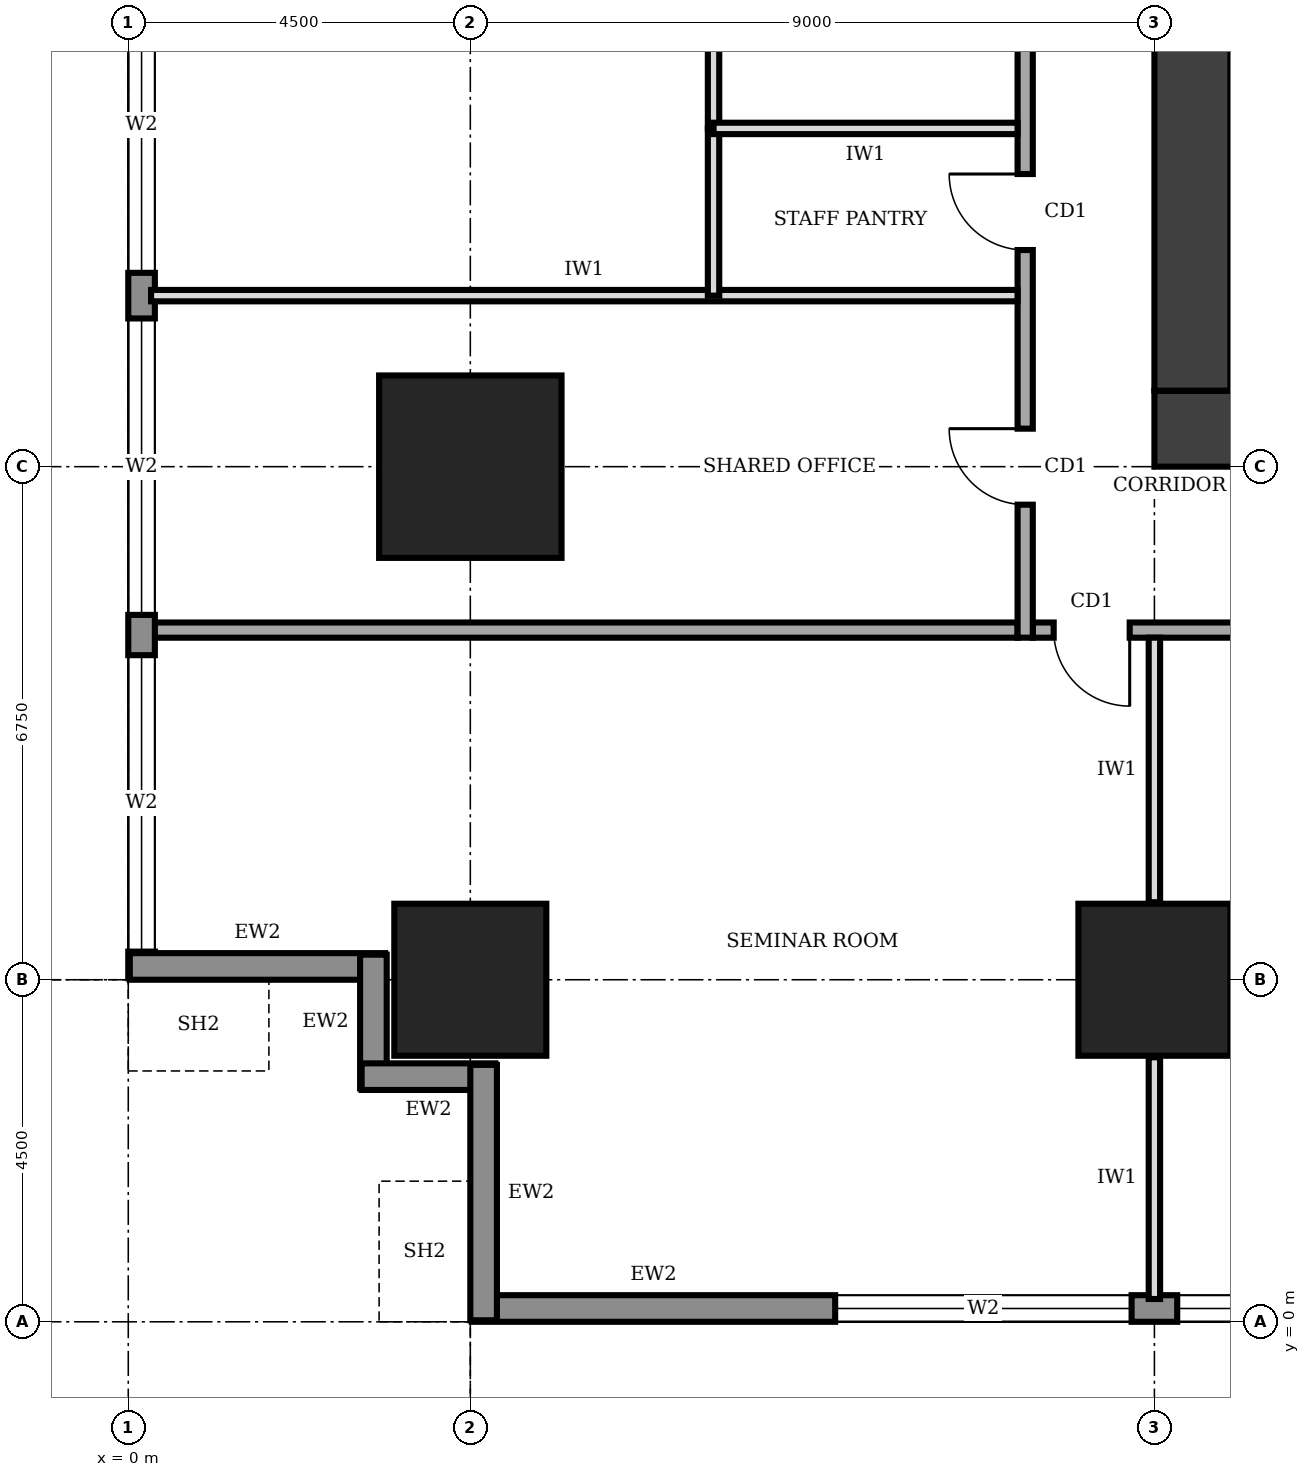
"""IFC4 building model, lengths in metres.
Left out: names, types, materials, properties, quantities, classifications, styles, units other than length and angle.
Written with IfcOpenShell. Run it as: python <this file> out.ifc"""

import sys

from ifc_helpers import new_model, si_unit, direction, frame, frame_2d, origin, origin_2d, place, context, subcontext, project, spatial, rectangle, extrude, element, fill, save


model = new_model("IFC4")
c1 = context("Model", 3, precision=1e-05, world=origin(), true_north=direction((0.0, 1.0)))
c2 = subcontext(c1, "Body", "Model", "MODEL_VIEW")
j1 = project(units=[si_unit("LENGTHUNIT", "METRE"), si_unit("PLANEANGLEUNIT", "RADIAN")], contexts=[c1])
p1 = place(None, origin())
s1 = spatial("IfcSite", under=j1, at=p1, CompositionType="ELEMENT")
p2 = place(p1, origin())
s2 = spatial("IfcBuilding", under=s1, at=p2, CompositionType="ELEMENT")
p3 = place(p2, frame((0.0, 0.0, 57.0)))
s3 = spatial("IfcBuildingStorey", under=s2, at=p3, CompositionType="ELEMENT", Elevation=57.0)
p4 = place(p3, frame((13.5, 11.75, 0.0), z_axis=(0.0, 0.0, 1.0), x_axis=(1.0, 0.0, 0.0)))
e1 = element("IfcWall", 1, at=p4, inside=s3, PredefinedType="SHEAR", context=c2, shape_type="SweptSolid", body=[
    extrude(rectangle(XDim=13.5, YDim=1.0, at=frame_2d((6.75, 0.0))), origin(), (0.0, 0.0, 1.0), 4.0),
])
p5 = place(p4, frame((4.75, 0.0, 0.0)))
e2 = element("IfcOpeningElement", 2, at=p5, cuts=e1, PredefinedType="OPENING", context=c2, shape_type="SweptSolid", body=[
    extrude(rectangle(XDim=1.0, YDim=2.1, at=frame_2d((0.5, 1.05))), frame((0.0, 0.51, 0.0), z_axis=(0.0, -1.0, 0.0), x_axis=(1.0, 0.0, 0.0)), (0.0, 0.0, 1.0), 1.02),
])
p6 = place(p3, frame((14.0, 28.25, 0.0), z_axis=(0.0, 0.0, 1.0), x_axis=(0.0, -1.0, 0.0)))
e3 = element("IfcWall", 3, at=p6, inside=s3, PredefinedType="SHEAR", context=c2, shape_type="SweptSolid", body=[
    extrude(rectangle(XDim=16.0, YDim=1.0, at=frame_2d((8.0, 0.0))), origin(), (0.0, 0.0, 1.0), 4.0),
])
for number, where, z_axis, x_axis in (
    (4, (4.5, 4.5, 0.0), (0.0, 0.0, 1.0), (1.0, 0.0, 0.0)),
    (5, (13.5, 4.5, 0.0), (0.0, 0.0, 1.0), (1.0, 0.0, 0.0)),
):
    element("IfcColumn", number, at=place(p3, frame(where, z_axis=z_axis, x_axis=x_axis)), inside=s3, PredefinedType="COLUMN", context=c2, shape_type="SweptSolid", body=[
        extrude(rectangle(XDim=2.0, YDim=2.0, at=origin_2d()), origin(), (0.0, 0.0, 1.0), 4.0),
    ])
p7 = place(p3, frame((4.5, 11.25, 0.0), z_axis=(0.0, 0.0, 1.0), x_axis=(1.0, 0.0, 0.0)))
e6 = element("IfcColumn", 6, at=p7, inside=s3, PredefinedType="COLUMN", context=c2, shape_type="SweptSolid", body=[
    extrude(rectangle(XDim=2.4, YDim=2.4, at=origin_2d()), origin(), (0.0, 0.0, 1.0), 4.0),
])
p8 = place(p3, frame((4.52, 0.175, 0.0), z_axis=(0.0, 0.0, 1.0), x_axis=(1.0, 0.0, 0.0)))
e7 = element("IfcWall", 7, at=p8, inside=s3, PredefinedType="STANDARD", context=c2, shape_type="SweptSolid", body=[
    extrude(rectangle(XDim=31.46, YDim=0.35, at=frame_2d((15.73, 0.0))), origin(), (0.0, 0.0, 1.0), 3.75),
])
p9 = place(p8, frame((4.78, 0.0, 0.6)))
e8 = element("IfcOpeningElement", 8, at=p9, cuts=e7, PredefinedType="OPENING", context=c2, shape_type="SweptSolid", body=[
    extrude(rectangle(XDim=3.9, YDim=2.6, at=frame_2d((1.95, 1.3))), frame((0.0, 0.185, 0.0), z_axis=(0.0, -1.0, 0.0), x_axis=(1.0, 0.0, 0.0)), (0.0, 0.0, 1.0), 0.37),
])
p10 = place(p8, frame((9.28, 0.0, 0.6)))
e9 = element("IfcOpeningElement", 9, at=p10, cuts=e7, PredefinedType="OPENING", context=c2, shape_type="SweptSolid", body=[
    extrude(rectangle(XDim=3.9, YDim=2.6, at=frame_2d((1.95, 1.3))), frame((0.0, 0.185, 0.0), z_axis=(0.0, -1.0, 0.0), x_axis=(1.0, 0.0, 0.0)), (0.0, 0.0, 1.0), 0.37),
])
p11 = place(p8, frame((13.78, 0.0, 0.6)))
e10 = element("IfcOpeningElement", 10, at=p11, cuts=e7, PredefinedType="OPENING", context=c2, shape_type="SweptSolid", body=[
    extrude(rectangle(XDim=3.9, YDim=2.6, at=frame_2d((1.95, 1.3))), frame((0.0, 0.185, 0.0), z_axis=(0.0, -1.0, 0.0), x_axis=(1.0, 0.0, 0.0)), (0.0, 0.0, 1.0), 0.37),
])
p12 = place(p8, frame((18.28, 0.0, 0.6)))
e11 = element("IfcOpeningElement", 11, at=p12, cuts=e7, PredefinedType="OPENING", context=c2, shape_type="SweptSolid", body=[
    extrude(rectangle(XDim=3.9, YDim=2.6, at=frame_2d((1.95, 1.3))), frame((0.0, 0.185, 0.0), z_axis=(0.0, -1.0, 0.0), x_axis=(1.0, 0.0, 0.0)), (0.0, 0.0, 1.0), 0.37),
])
p13 = place(p8, frame((22.78, 0.0, 0.6)))
e12 = element("IfcOpeningElement", 12, at=p13, cuts=e7, PredefinedType="OPENING", context=c2, shape_type="SweptSolid", body=[
    extrude(rectangle(XDim=3.9, YDim=2.6, at=frame_2d((1.95, 1.3))), frame((0.0, 0.185, 0.0), z_axis=(0.0, -1.0, 0.0), x_axis=(1.0, 0.0, 0.0)), (0.0, 0.0, 1.0), 0.37),
])
p14 = place(p8, frame((27.21, 0.0, 0.6)))
e13 = element("IfcOpeningElement", 13, at=p14, cuts=e7, PredefinedType="OPENING", context=c2, shape_type="SweptSolid", body=[
    extrude(rectangle(XDim=3.9, YDim=2.6, at=frame_2d((1.95, 1.3))), frame((0.0, 0.185, 0.0), z_axis=(0.0, -1.0, 0.0), x_axis=(1.0, 0.0, 0.0)), (0.0, 0.0, 1.0), 0.37),
])
p15 = place(p3, frame((0.175, 35.98, 0.0), z_axis=(0.0, 0.0, 1.0), x_axis=(0.0, -1.0, 0.0)))
e14 = element("IfcWall", 14, at=p15, inside=s3, PredefinedType="STANDARD", context=c2, shape_type="SweptSolid", body=[
    extrude(rectangle(XDim=31.46, YDim=0.35, at=frame_2d((15.73, 0.0))), origin(), (0.0, 0.0, 1.0), 3.75),
])
p16 = place(p15, frame((27.21, 0.0, 0.6)))
e15 = element("IfcOpeningElement", 15, at=p16, cuts=e14, PredefinedType="OPENING", context=c2, shape_type="SweptSolid", body=[
    extrude(rectangle(XDim=3.9, YDim=2.6, at=frame_2d((1.95, 1.3))), frame((0.0, 0.185, 0.0), z_axis=(0.0, -1.0, 0.0), x_axis=(1.0, 0.0, 0.0)), (0.0, 0.0, 1.0), 0.37),
])
p17 = place(p15, frame((22.78, 0.0, 0.6)))
e16 = element("IfcOpeningElement", 16, at=p17, cuts=e14, PredefinedType="OPENING", context=c2, shape_type="SweptSolid", body=[
    extrude(rectangle(XDim=3.9, YDim=2.6, at=frame_2d((1.95, 1.3))), frame((0.0, 0.185, 0.0), z_axis=(0.0, -1.0, 0.0), x_axis=(1.0, 0.0, 0.0)), (0.0, 0.0, 1.0), 0.37),
])
p18 = place(p15, frame((18.28, 0.0, 0.6)))
e17 = element("IfcOpeningElement", 17, at=p18, cuts=e14, PredefinedType="OPENING", context=c2, shape_type="SweptSolid", body=[
    extrude(rectangle(XDim=3.9, YDim=2.6, at=frame_2d((1.95, 1.3))), frame((0.0, 0.185, 0.0), z_axis=(0.0, -1.0, 0.0), x_axis=(1.0, 0.0, 0.0)), (0.0, 0.0, 1.0), 0.37),
])
p19 = place(p15, frame((13.78, 0.0, 0.6)))
e18 = element("IfcOpeningElement", 18, at=p19, cuts=e14, PredefinedType="OPENING", context=c2, shape_type="SweptSolid", body=[
    extrude(rectangle(XDim=3.9, YDim=2.6, at=frame_2d((1.95, 1.3))), frame((0.0, 0.185, 0.0), z_axis=(0.0, -1.0, 0.0), x_axis=(1.0, 0.0, 0.0)), (0.0, 0.0, 1.0), 0.37),
])
p20 = place(p15, frame((9.28, 0.0, 0.6)))
e19 = element("IfcOpeningElement", 19, at=p20, cuts=e14, PredefinedType="OPENING", context=c2, shape_type="SweptSolid", body=[
    extrude(rectangle(XDim=3.9, YDim=2.6, at=frame_2d((1.95, 1.3))), frame((0.0, 0.185, 0.0), z_axis=(0.0, -1.0, 0.0), x_axis=(1.0, 0.0, 0.0)), (0.0, 0.0, 1.0), 0.37),
])
p21 = place(p15, frame((4.78, 0.0, 0.6)))
e20 = element("IfcOpeningElement", 20, at=p21, cuts=e14, PredefinedType="OPENING", context=c2, shape_type="SweptSolid", body=[
    extrude(rectangle(XDim=3.9, YDim=2.6, at=frame_2d((1.95, 1.3))), frame((0.0, 0.185, 0.0), z_axis=(0.0, -1.0, 0.0), x_axis=(1.0, 0.0, 0.0)), (0.0, 0.0, 1.0), 0.37),
])
p22 = place(p3, frame((0.02, 4.675, 0.0), z_axis=(0.0, 0.0, 1.0), x_axis=(1.0, 0.0, 0.0)))
e21 = element("IfcWall", 21, at=p22, inside=s3, PredefinedType="STANDARD", context=c2, shape_type="SweptSolid", body=[
    extrude(rectangle(XDim=3.36, YDim=0.35, at=frame_2d((1.68, 0.0))), origin(), (0.0, 0.0, 1.0), 2.85),
])
for number, where, z_axis, x_axis in (
    (22, (3.225, 4.83, 0.0), (0.0, 0.0, 1.0), (0.0, -1.0, 0.0)),
    (23, (3.07, 3.225, 0.0), (0.0, 0.0, 1.0), (1.0, 0.0, 0.0)),
):
    element("IfcWall", number, at=place(p3, frame(where, z_axis=z_axis, x_axis=x_axis)), inside=s3, PredefinedType="STANDARD", context=c2, shape_type="SweptSolid", body=[
        extrude(rectangle(XDim=1.76, YDim=0.35, at=frame_2d((0.88, 0.0))), origin(), (0.0, 0.0, 1.0), 3.75),
    ])
p23 = place(p3, frame((4.675, 3.38, 0.0), z_axis=(0.0, 0.0, 1.0), x_axis=(0.0, -1.0, 0.0)))
e24 = element("IfcWall", 24, at=p23, inside=s3, PredefinedType="STANDARD", context=c2, shape_type="SweptSolid", body=[
    extrude(rectangle(XDim=3.36, YDim=0.35, at=frame_2d((1.68, 0.0))), origin(), (0.0, 0.0, 1.0), 2.85),
])
p24 = place(p3, frame((11.9, 9.1, 0.0), z_axis=(0.0, 0.0, 1.0), x_axis=(1.0, 0.0, 0.0)))
e25 = element("IfcWall", 25, at=p24, inside=s3, PredefinedType="SOLIDWALL", context=c2, shape_type="SweptSolid", body=[
    extrude(rectangle(XDim=16.9, YDim=0.2, at=frame_2d((8.45, 0.0))), origin(), (0.0, 0.0, 1.0), 3.75),
])
p25 = place(p24, frame((0.275, 0.0, 0.0)))
e26 = element("IfcOpeningElement", 26, at=p25, cuts=e25, PredefinedType="OPENING", context=c2, shape_type="SweptSolid", body=[
    extrude(rectangle(XDim=1.0, YDim=2.1, at=frame_2d((0.5, 1.05))), frame((0.0, 0.11, 0.0), z_axis=(0.0, -1.0, 0.0), x_axis=(1.0, 0.0, 0.0)), (0.0, 0.0, 1.0), 0.22),
])
p26 = place(p24, frame((7.45, 0.0, 0.0)))
e27 = element("IfcOpeningElement", 27, at=p26, cuts=e25, PredefinedType="OPENING", context=c2, shape_type="SweptSolid", body=[
    extrude(rectangle(XDim=1.8, YDim=2.1, at=frame_2d((0.9, 1.05))), frame((0.0, 0.11, 0.0), z_axis=(0.0, -1.0, 0.0), x_axis=(1.0, 0.0, 0.0)), (0.0, 0.0, 1.0), 0.22),
])
p27 = place(p24, frame((15.425, 0.0, 0.0)))
e28 = element("IfcOpeningElement", 28, at=p27, cuts=e25, PredefinedType="OPENING", context=c2, shape_type="SweptSolid", body=[
    extrude(rectangle(XDim=1.0, YDim=2.1, at=frame_2d((0.5, 1.05))), frame((0.0, 0.11, 0.0), z_axis=(0.0, -1.0, 0.0), x_axis=(1.0, 0.0, 0.0)), (0.0, 0.0, 1.0), 0.22),
])
p28 = place(p3, frame((11.8, 32.8, 0.0), z_axis=(0.0, 0.0, 1.0), x_axis=(0.0, -1.0, 0.0)))
e29 = element("IfcWall", 29, at=p28, inside=s3, PredefinedType="SOLIDWALL", context=c2, shape_type="SweptSolid", body=[
    extrude(rectangle(XDim=23.8, YDim=0.2, at=frame_2d((11.9, 0.0))), origin(), (0.0, 0.0, 1.0), 3.75),
])
p29 = place(p28, frame((21.05, 0.0, 0.0)))
e30 = element("IfcOpeningElement", 30, at=p29, cuts=e29, PredefinedType="OPENING", context=c2, shape_type="SweptSolid", body=[
    extrude(rectangle(XDim=1.0, YDim=2.1, at=frame_2d((0.5, 1.05))), frame((0.0, 0.11, 0.0), z_axis=(0.0, -1.0, 0.0), x_axis=(1.0, 0.0, 0.0)), (0.0, 0.0, 1.0), 0.22),
])
p30 = place(p28, frame((17.7, 0.0, 0.0)))
e31 = element("IfcOpeningElement", 31, at=p30, cuts=e29, PredefinedType="OPENING", context=c2, shape_type="SweptSolid", body=[
    extrude(rectangle(XDim=1.0, YDim=2.1, at=frame_2d((0.5, 1.05))), frame((0.0, 0.11, 0.0), z_axis=(0.0, -1.0, 0.0), x_axis=(1.0, 0.0, 0.0)), (0.0, 0.0, 1.0), 0.22),
])
p31 = place(p28, frame((14.7, 0.0, 0.0)))
e32 = element("IfcOpeningElement", 32, at=p31, cuts=e29, PredefinedType="OPENING", context=c2, shape_type="SweptSolid", body=[
    extrude(rectangle(XDim=0.9, YDim=2.1, at=frame_2d((0.45, 1.05))), frame((0.0, 0.11, 0.0), z_axis=(0.0, -1.0, 0.0), x_axis=(1.0, 0.0, 0.0)), (0.0, 0.0, 1.0), 0.22),
])
p32 = place(p28, frame((11.65, 0.0, 0.0)))
e33 = element("IfcOpeningElement", 33, at=p32, cuts=e29, PredefinedType="OPENING", context=c2, shape_type="SweptSolid", body=[
    extrude(rectangle(XDim=0.9, YDim=2.1, at=frame_2d((0.45, 1.05))), frame((0.0, 0.11, 0.0), z_axis=(0.0, -1.0, 0.0), x_axis=(1.0, 0.0, 0.0)), (0.0, 0.0, 1.0), 0.22),
])
p33 = place(p28, frame((6.95, 0.0, 0.0)))
e34 = element("IfcOpeningElement", 34, at=p33, cuts=e29, PredefinedType="OPENING", context=c2, shape_type="SweptSolid", body=[
    extrude(rectangle(XDim=0.9, YDim=2.1, at=frame_2d((0.45, 1.05))), frame((0.0, 0.11, 0.0), z_axis=(0.0, -1.0, 0.0), x_axis=(1.0, 0.0, 0.0)), (0.0, 0.0, 1.0), 0.22),
])
p34 = place(p28, frame((9.5, 0.0, 0.0)))
e35 = element("IfcOpeningElement", 35, at=p34, cuts=e29, PredefinedType="OPENING", context=c2, shape_type="SweptSolid", body=[
    extrude(rectangle(XDim=1.0, YDim=2.1, at=frame_2d((0.5, 1.05))), frame((0.0, 0.11, 0.0), z_axis=(0.0, -1.0, 0.0), x_axis=(1.0, 0.0, 0.0)), (0.0, 0.0, 1.0), 0.22),
])
p35 = place(p28, frame((2.3, 0.0, 0.0)))
e36 = element("IfcOpeningElement", 36, at=p35, cuts=e29, PredefinedType="OPENING", context=c2, shape_type="SweptSolid", body=[
    extrude(rectangle(XDim=1.0, YDim=2.1, at=frame_2d((0.5, 1.05))), frame((0.0, 0.11, 0.0), z_axis=(0.0, -1.0, 0.0), x_axis=(1.0, 0.0, 0.0)), (0.0, 0.0, 1.0), 0.22),
])
p36 = place(p3, frame((0.3, 9.1, 0.0), z_axis=(0.0, 0.0, 1.0), x_axis=(1.0, 0.0, 0.0)))
e37 = element("IfcWall", 37, at=p36, inside=s3, PredefinedType="SOLIDWALL", context=c2, shape_type="SweptSolid", body=[
    extrude(rectangle(XDim=11.4, YDim=0.2, at=frame_2d((5.7, 0.0))), origin(), (0.0, 0.0, 1.0), 3.75),
])
p37 = place(p3, frame((13.5, 0.3, 0.0), z_axis=(0.0, 0.0, 1.0), x_axis=(0.0, 1.0, 0.0)))
e38 = element("IfcWall", 38, at=p37, inside=s3, PredefinedType="PARTITIONING", context=c2, shape_type="SweptSolid", body=[
    extrude(rectangle(XDim=3.18, YDim=0.15, at=frame_2d((1.59, 0.0))), origin(), (0.0, 0.0, 1.0), 2.85),
])
p38 = place(p3, frame((13.5, 5.52, 0.0), z_axis=(0.0, 0.0, 1.0), x_axis=(0.0, 1.0, 0.0)))
e39 = element("IfcWall", 39, at=p38, inside=s3, PredefinedType="PARTITIONING", context=c2, shape_type="SweptSolid", body=[
    extrude(rectangle(XDim=3.48, YDim=0.15, at=frame_2d((1.74, 0.0))), origin(), (0.0, 0.0, 1.0), 2.85),
])
p39 = place(p3, frame((0.3, 13.5, 0.0), z_axis=(0.0, 0.0, 1.0), x_axis=(1.0, 0.0, 0.0)))
e40 = element("IfcWall", 40, at=p39, inside=s3, PredefinedType="PARTITIONING", context=c2, shape_type="SweptSolid", body=[
    extrude(rectangle(XDim=11.4, YDim=0.15, at=frame_2d((5.7, 0.0))), origin(), (0.0, 0.0, 1.0), 3.75),
])
p40 = place(p3, frame((11.7, 15.7, 0.0), z_axis=(0.0, 0.0, 1.0), x_axis=(-1.0, 0.0, 0.0)))
e41 = element("IfcWall", 41, at=p40, inside=s3, PredefinedType="PARTITIONING", context=c2, shape_type="SweptSolid", body=[
    extrude(rectangle(XDim=4.0, YDim=0.15, at=frame_2d((2.0, 0.0))), origin(), (0.0, 0.0, 1.0), 3.75),
])
p41 = place(p3, frame((7.7, 13.5, 0.0), z_axis=(0.0, 0.0, 1.0), x_axis=(0.0, 1.0, 0.0)))
e42 = element("IfcWall", 42, at=p41, inside=s3, PredefinedType="PARTITIONING", context=c2, shape_type="SweptSolid", body=[
    extrude(rectangle(XDim=2.2, YDim=0.15, at=frame_2d((1.1, 0.0))), origin(), (0.0, 0.0, 1.0), 3.75),
])
p42 = place(p3, frame((7.7, 15.7, 0.0), z_axis=(0.0, 0.0, 1.0), x_axis=(0.0, 1.0, 0.0)))
e43 = element("IfcWall", 43, at=p42, inside=s3, PredefinedType="PARTITIONING", context=c2, shape_type="SweptSolid", body=[
    extrude(rectangle(XDim=3.9, YDim=0.15, at=frame_2d((1.95, 0.0))), origin(), (0.0, 0.0, 1.0), 3.75),
])
p43 = place(p9, origin())
e44 = element("IfcWindow", 44, at=p43, inside=s3, PartitioningType="SINGLE_PANEL", PredefinedType="WINDOW", context=c2, shape_type="SweptSolid", body=[
    extrude(rectangle(XDim=3.9, YDim=2.6, at=frame_2d((1.95, 1.3))), frame((0.0, 0.03, 0.0), z_axis=(0.0, -1.0, 0.0), x_axis=(1.0, 0.0, 0.0)), (0.0, 0.0, 1.0), 0.06),
])
fill(e8, e44)
p44 = place(p10, origin())
e45 = element("IfcWindow", 45, at=p44, inside=s3, PartitioningType="SINGLE_PANEL", PredefinedType="WINDOW", context=c2, shape_type="SweptSolid", body=[
    extrude(rectangle(XDim=3.9, YDim=2.6, at=frame_2d((1.95, 1.3))), frame((0.0, 0.03, 0.0), z_axis=(0.0, -1.0, 0.0), x_axis=(1.0, 0.0, 0.0)), (0.0, 0.0, 1.0), 0.06),
])
fill(e9, e45)
p45 = place(p16, origin())
e46 = element("IfcWindow", 46, at=p45, inside=s3, PartitioningType="SINGLE_PANEL", PredefinedType="WINDOW", context=c2, shape_type="SweptSolid", body=[
    extrude(rectangle(XDim=3.9, YDim=2.6, at=frame_2d((1.95, 1.3))), frame((0.0, 0.03, 0.0), z_axis=(0.0, -1.0, 0.0), x_axis=(1.0, 0.0, 0.0)), (0.0, 0.0, 1.0), 0.06),
])
fill(e15, e46)
p46 = place(p17, origin())
e47 = element("IfcWindow", 47, at=p46, inside=s3, PartitioningType="SINGLE_PANEL", PredefinedType="WINDOW", context=c2, shape_type="SweptSolid", body=[
    extrude(rectangle(XDim=3.9, YDim=2.6, at=frame_2d((1.95, 1.3))), frame((0.0, 0.03, 0.0), z_axis=(0.0, -1.0, 0.0), x_axis=(1.0, 0.0, 0.0)), (0.0, 0.0, 1.0), 0.06),
])
fill(e16, e47)
p47 = place(p18, origin())
e48 = element("IfcWindow", 48, at=p47, inside=s3, PartitioningType="SINGLE_PANEL", PredefinedType="WINDOW", context=c2, shape_type="SweptSolid", body=[
    extrude(rectangle(XDim=3.9, YDim=2.6, at=frame_2d((1.95, 1.3))), frame((0.0, 0.03, 0.0), z_axis=(0.0, -1.0, 0.0), x_axis=(1.0, 0.0, 0.0)), (0.0, 0.0, 1.0), 0.06),
])
fill(e17, e48)
p48 = place(p25, frame((1.0, 0.0, 0.0), z_axis=(0.0, 0.0, 1.0), x_axis=(-1.0, 0.0, 0.0)))
e49 = element("IfcDoor", 49, at=p48, inside=s3, OperationType="SINGLE_SWING_LEFT", PredefinedType="DOOR", context=c2, shape_type="SweptSolid", body=[
    extrude(rectangle(XDim=1.0, YDim=2.1, at=frame_2d((0.5, 1.05))), frame((0.0, 0.025, 0.0), z_axis=(0.0, -1.0, 0.0), x_axis=(1.0, 0.0, 0.0)), (0.0, 0.0, 1.0), 0.05),
])
fill(e26, e49)
p49 = place(p29, frame((1.0, 0.0, 0.0), z_axis=(0.0, 0.0, 1.0), x_axis=(-1.0, 0.0, 0.0)))
e50 = element("IfcDoor", 50, at=p49, inside=s3, OperationType="SINGLE_SWING_RIGHT", PredefinedType="DOOR", context=c2, shape_type="SweptSolid", body=[
    extrude(rectangle(XDim=1.0, YDim=2.1, at=frame_2d((0.5, 1.05))), frame((0.0, 0.025, 0.0), z_axis=(0.0, -1.0, 0.0), x_axis=(1.0, 0.0, 0.0)), (0.0, 0.0, 1.0), 0.05),
])
fill(e30, e50)
p50 = place(p30, frame((1.0, 0.0, 0.0), z_axis=(0.0, 0.0, 1.0), x_axis=(-1.0, 0.0, 0.0)))
e51 = element("IfcDoor", 51, at=p50, inside=s3, OperationType="SINGLE_SWING_RIGHT", PredefinedType="DOOR", context=c2, shape_type="SweptSolid", body=[
    extrude(rectangle(XDim=1.0, YDim=2.1, at=frame_2d((0.5, 1.05))), frame((0.0, 0.025, 0.0), z_axis=(0.0, -1.0, 0.0), x_axis=(1.0, 0.0, 0.0)), (0.0, 0.0, 1.0), 0.05),
])
fill(e31, e51)
save(model, sys.argv[1])
